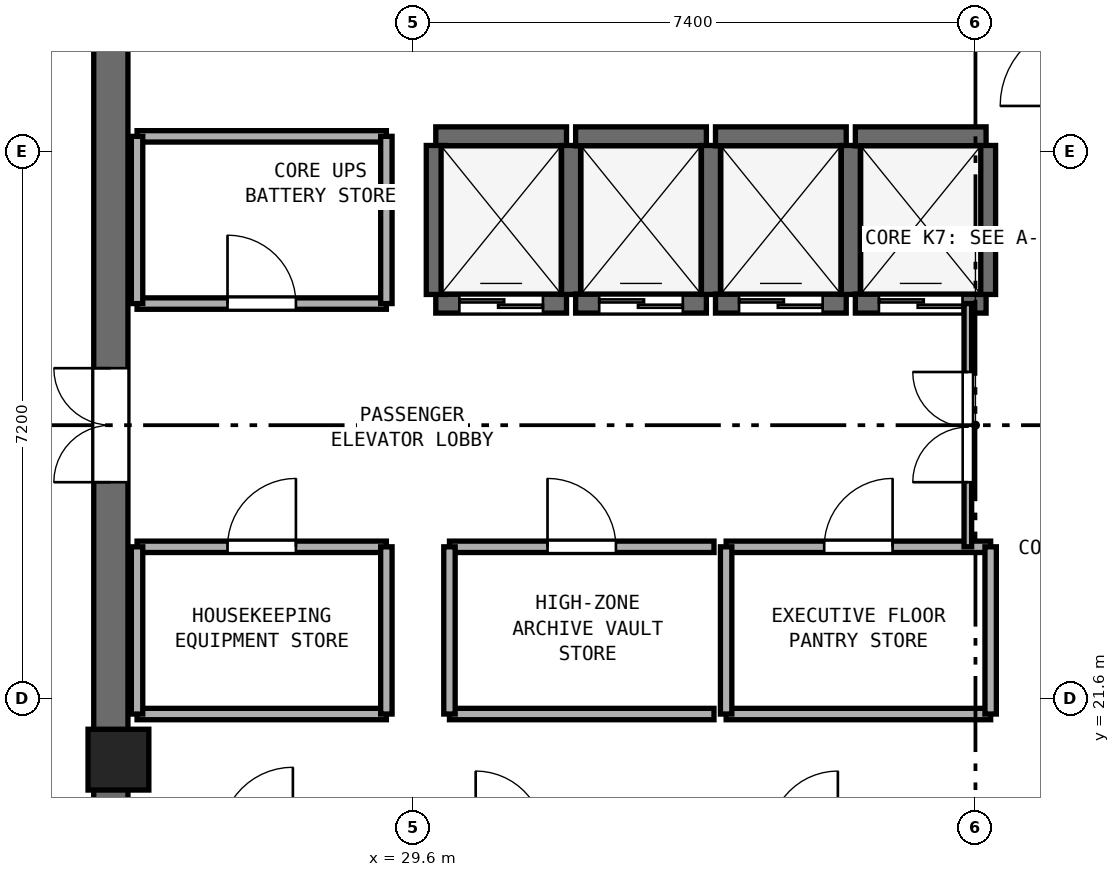
"""IFC4 building model, lengths in metres.
Left out: names, types, materials, properties, quantities, classifications, styles, units other than length and angle.
Written with IfcOpenShell. Run it as: python <this file> out.ifc"""

import sys

from ifc_helpers import new_model, si_unit, direction, frame, frame_2d, origin, origin_2d, place, context, subcontext, project, spatial, rectangle, extrude, element, fill, save


model = new_model("IFC4")
c1 = context("Model", 3, precision=1e-05, world=origin(), true_north=direction((0.0, 1.0)))
c2 = subcontext(c1, "Body", "Model", "MODEL_VIEW")
j1 = project(units=[si_unit("LENGTHUNIT", "METRE"), si_unit("PLANEANGLEUNIT", "RADIAN")], contexts=[c1])
p1 = place(None, origin())
s1 = spatial("IfcSite", under=j1, at=p1, CompositionType="ELEMENT")
p2 = place(p1, origin())
s2 = spatial("IfcBuilding", under=s1, at=p2, CompositionType="ELEMENT")
p3 = place(p2, frame((0.0, 0.0, 293.4)))
s3 = spatial("IfcBuildingStorey", under=s2, at=p3, CompositionType="ELEMENT", Elevation=293.4)
p4 = place(p3, frame((25.625, 17.45, 0.0), z_axis=(0.0, 0.0, 1.0), x_axis=(0.0, 1.0, 0.0)))
e1 = element("IfcWall", 1, at=p4, inside=s3, PredefinedType="SHEAR", context=c2, shape_type="SweptSolid", body=[
    extrude(rectangle(XDim=15.5, YDim=0.45, at=frame_2d((7.75, 0.0))), origin(), (0.0, 0.0, 1.0), 3.54),
])
p5 = place(p4, frame((7.0, 0.0, 0.0)))
e2 = element("IfcOpeningElement", 2, at=p5, cuts=e1, PredefinedType="OPENING", context=c2, shape_type="SweptSolid", body=[
    extrude(rectangle(XDim=1.5, YDim=2.15, at=frame_2d((0.75, 1.075))), frame((0.0, 0.235, 0.0), z_axis=(0.0, -1.0, 0.0), x_axis=(1.0, 0.0, 0.0)), (0.0, 0.0, 1.0), 0.47),
])
p6 = place(p3, frame((25.725, 20.8, 0.0), z_axis=(0.0, 0.0, 1.0), x_axis=(1.0, 0.0, 0.0)))
e3 = element("IfcColumn", 3, at=p6, inside=s3, PredefinedType="PILASTER", context=c2, shape_type="SweptSolid", body=[
    extrude(rectangle(XDim=0.8, YDim=0.8, at=origin_2d()), origin(), (0.0, 0.0, 1.0), 3.8),
])
p7 = place(p3, frame((29.9, 26.8, 0.0), z_axis=(0.0, 0.0, 1.0), x_axis=(1.0, 0.0, 0.0)))
e4 = element("IfcWall", 4, at=p7, inside=s3, PredefinedType="SHEAR", context=c2, shape_type="SweptSolid", body=[
    extrude(rectangle(XDim=1.72, YDim=0.25, at=frame_2d((0.86, 0.0))), origin(), (0.0, 0.0, 1.0), 3.54),
])
p8 = place(p7, frame((0.31, 0.0, 0.0)))
e5 = element("IfcOpeningElement", 5, at=p8, cuts=e4, PredefinedType="OPENING", context=c2, shape_type="SweptSolid", body=[
    extrude(rectangle(XDim=1.1, YDim=2.15, at=frame_2d((0.55, 1.075))), frame((0.0, 0.135, 0.0), z_axis=(0.0, -1.0, 0.0), x_axis=(1.0, 0.0, 0.0)), (0.0, 0.0, 1.0), 0.27),
])
p9 = place(p3, frame((29.9, 29.0, 0.0), z_axis=(0.0, 0.0, 1.0), x_axis=(1.0, 0.0, 0.0)))
e6 = element("IfcWall", 6, at=p9, inside=s3, PredefinedType="SHEAR", context=c2, shape_type="SweptSolid", body=[
    extrude(rectangle(XDim=1.72, YDim=0.25, at=frame_2d((0.86, 0.0))), origin(), (0.0, 0.0, 1.0), 3.54),
])
for number, where, z_axis, x_axis in (
    (7, (29.9, 26.92, 0.0), (0.0, 0.0, 1.0), (0.0, 1.0, 0.0)),
    (8, (31.68, 26.92, 0.0), (0.0, 0.0, 1.0), (0.0, 1.0, 0.0)),
):
    element("IfcWall", number, at=place(p3, frame(where, z_axis=z_axis, x_axis=x_axis)), inside=s3, PredefinedType="SHEAR", context=c2, shape_type="SweptSolid", body=[
        extrude(rectangle(XDim=1.96, YDim=0.25, at=frame_2d((0.98, 0.0))), origin(), (0.0, 0.0, 1.0), 3.54),
    ])
p10 = place(p3, frame((31.74, 26.8, 0.0), z_axis=(0.0, 0.0, 1.0), x_axis=(1.0, 0.0, 0.0)))
e9 = element("IfcWall", 9, at=p10, inside=s3, PredefinedType="SHEAR", context=c2, shape_type="SweptSolid", body=[
    extrude(rectangle(XDim=1.72, YDim=0.25, at=frame_2d((0.86, 0.0))), origin(), (0.0, 0.0, 1.0), 3.54),
])
p11 = place(p10, frame((0.31, 0.0, 0.0)))
e10 = element("IfcOpeningElement", 10, at=p11, cuts=e9, PredefinedType="OPENING", context=c2, shape_type="SweptSolid", body=[
    extrude(rectangle(XDim=1.1, YDim=2.15, at=frame_2d((0.55, 1.075))), frame((0.0, 0.135, 0.0), z_axis=(0.0, -1.0, 0.0), x_axis=(1.0, 0.0, 0.0)), (0.0, 0.0, 1.0), 0.27),
])
p12 = place(p3, frame((31.74, 29.0, 0.0), z_axis=(0.0, 0.0, 1.0), x_axis=(1.0, 0.0, 0.0)))
e11 = element("IfcWall", 11, at=p12, inside=s3, PredefinedType="SHEAR", context=c2, shape_type="SweptSolid", body=[
    extrude(rectangle(XDim=1.72, YDim=0.25, at=frame_2d((0.86, 0.0))), origin(), (0.0, 0.0, 1.0), 3.54),
])
p13 = place(p3, frame((33.52, 26.92, 0.0), z_axis=(0.0, 0.0, 1.0), x_axis=(0.0, 1.0, 0.0)))
e12 = element("IfcWall", 12, at=p13, inside=s3, PredefinedType="SHEAR", context=c2, shape_type="SweptSolid", body=[
    extrude(rectangle(XDim=1.96, YDim=0.25, at=frame_2d((0.98, 0.0))), origin(), (0.0, 0.0, 1.0), 3.54),
])
p14 = place(p3, frame((33.58, 26.8, 0.0), z_axis=(0.0, 0.0, 1.0), x_axis=(1.0, 0.0, 0.0)))
e13 = element("IfcWall", 13, at=p14, inside=s3, PredefinedType="SHEAR", context=c2, shape_type="SweptSolid", body=[
    extrude(rectangle(XDim=1.72, YDim=0.25, at=frame_2d((0.86, 0.0))), origin(), (0.0, 0.0, 1.0), 3.54),
])
p15 = place(p14, frame((0.31, 0.0, 0.0)))
e14 = element("IfcOpeningElement", 14, at=p15, cuts=e13, PredefinedType="OPENING", context=c2, shape_type="SweptSolid", body=[
    extrude(rectangle(XDim=1.1, YDim=2.15, at=frame_2d((0.55, 1.075))), frame((0.0, 0.135, 0.0), z_axis=(0.0, -1.0, 0.0), x_axis=(1.0, 0.0, 0.0)), (0.0, 0.0, 1.0), 0.27),
])
p16 = place(p3, frame((33.58, 29.0, 0.0), z_axis=(0.0, 0.0, 1.0), x_axis=(1.0, 0.0, 0.0)))
e15 = element("IfcWall", 15, at=p16, inside=s3, PredefinedType="SHEAR", context=c2, shape_type="SweptSolid", body=[
    extrude(rectangle(XDim=1.72, YDim=0.25, at=frame_2d((0.86, 0.0))), origin(), (0.0, 0.0, 1.0), 3.54),
])
p17 = place(p3, frame((35.36, 26.92, 0.0), z_axis=(0.0, 0.0, 1.0), x_axis=(0.0, 1.0, 0.0)))
e16 = element("IfcWall", 16, at=p17, inside=s3, PredefinedType="SHEAR", context=c2, shape_type="SweptSolid", body=[
    extrude(rectangle(XDim=1.96, YDim=0.25, at=frame_2d((0.98, 0.0))), origin(), (0.0, 0.0, 1.0), 3.54),
])
p18 = place(p3, frame((35.42, 26.8, 0.0), z_axis=(0.0, 0.0, 1.0), x_axis=(1.0, 0.0, 0.0)))
e17 = element("IfcWall", 17, at=p18, inside=s3, PredefinedType="SHEAR", context=c2, shape_type="SweptSolid", body=[
    extrude(rectangle(XDim=1.72, YDim=0.25, at=frame_2d((0.86, 0.0))), origin(), (0.0, 0.0, 1.0), 3.54),
])
p19 = place(p18, frame((0.31, 0.0, 0.0)))
e18 = element("IfcOpeningElement", 18, at=p19, cuts=e17, PredefinedType="OPENING", context=c2, shape_type="SweptSolid", body=[
    extrude(rectangle(XDim=1.1, YDim=2.15, at=frame_2d((0.55, 1.075))), frame((0.0, 0.135, 0.0), z_axis=(0.0, -1.0, 0.0), x_axis=(1.0, 0.0, 0.0)), (0.0, 0.0, 1.0), 0.27),
])
p20 = place(p3, frame((35.42, 29.0, 0.0), z_axis=(0.0, 0.0, 1.0), x_axis=(1.0, 0.0, 0.0)))
e19 = element("IfcWall", 19, at=p20, inside=s3, PredefinedType="SHEAR", context=c2, shape_type="SweptSolid", body=[
    extrude(rectangle(XDim=1.72, YDim=0.25, at=frame_2d((0.86, 0.0))), origin(), (0.0, 0.0, 1.0), 3.54),
])
p21 = place(p3, frame((37.14, 26.92, 0.0), z_axis=(0.0, 0.0, 1.0), x_axis=(0.0, 1.0, 0.0)))
e20 = element("IfcWall", 20, at=p21, inside=s3, PredefinedType="SHEAR", context=c2, shape_type="SweptSolid", body=[
    extrude(rectangle(XDim=1.96, YDim=0.25, at=frame_2d((0.98, 0.0))), origin(), (0.0, 0.0, 1.0), 3.54),
])
p22 = place(p3, frame((25.97, 26.8, 0.0), z_axis=(0.0, 0.0, 1.0), x_axis=(1.0, 0.0, 0.0)))
e21 = element("IfcWall", 21, at=p22, inside=s3, PredefinedType="PARTITIONING", context=c2, shape_type="SweptSolid", body=[
    extrude(rectangle(XDim=3.28, YDim=0.15, at=frame_2d((1.64, 0.0))), origin(), (0.0, 0.0, 1.0), 3.54),
])
p23 = place(p22, frame((1.19, 0.0, 0.0)))
e22 = element("IfcOpeningElement", 22, at=p23, cuts=e21, PredefinedType="OPENING", context=c2, shape_type="SweptSolid", body=[
    extrude(rectangle(XDim=0.9, YDim=2.1, at=frame_2d((0.45, 1.05))), frame((0.0, 0.085, 0.0), z_axis=(0.0, -1.0, 0.0), x_axis=(1.0, 0.0, 0.0)), (0.0, 0.0, 1.0), 0.17),
])
p24 = place(p3, frame((25.97, 29.0, 0.0), z_axis=(0.0, 0.0, 1.0), x_axis=(1.0, 0.0, 0.0)))
e23 = element("IfcWall", 23, at=p24, inside=s3, PredefinedType="PARTITIONING", context=c2, shape_type="SweptSolid", body=[
    extrude(rectangle(XDim=3.28, YDim=0.15, at=frame_2d((1.64, 0.0))), origin(), (0.0, 0.0, 1.0), 3.54),
])
p25 = place(p3, frame((25.97, 26.8, 0.0), z_axis=(0.0, 0.0, 1.0), x_axis=(0.0, 1.0, 0.0)))
e24 = element("IfcWall", 24, at=p25, inside=s3, PredefinedType="PARTITIONING", context=c2, shape_type="SweptSolid", body=[
    extrude(rectangle(XDim=2.2, YDim=0.15, at=frame_2d((1.1, 0.0))), origin(), (0.0, 0.0, 1.0), 2.64),
])
p26 = place(p3, frame((29.25, 26.8, 0.0), z_axis=(0.0, 0.0, 1.0), x_axis=(0.0, 1.0, 0.0)))
e25 = element("IfcWall", 25, at=p26, inside=s3, PredefinedType="PARTITIONING", context=c2, shape_type="SweptSolid", body=[
    extrude(rectangle(XDim=2.2, YDim=0.15, at=frame_2d((1.1, 0.0))), origin(), (0.0, 0.0, 1.0), 3.54),
])
p27 = place(p3, frame((25.97, 21.4, 0.0), z_axis=(0.0, 0.0, 1.0), x_axis=(1.0, 0.0, 0.0)))
e26 = element("IfcWall", 26, at=p27, inside=s3, PredefinedType="PARTITIONING", context=c2, shape_type="SweptSolid", body=[
    extrude(rectangle(XDim=3.28, YDim=0.15, at=frame_2d((1.64, 0.0))), origin(), (0.0, 0.0, 1.0), 3.54),
])
p28 = place(p3, frame((25.97, 23.6, 0.0), z_axis=(0.0, 0.0, 1.0), x_axis=(1.0, 0.0, 0.0)))
e27 = element("IfcWall", 27, at=p28, inside=s3, PredefinedType="PARTITIONING", context=c2, shape_type="SweptSolid", body=[
    extrude(rectangle(XDim=3.28, YDim=0.15, at=frame_2d((1.64, 0.0))), origin(), (0.0, 0.0, 1.0), 3.54),
])
p29 = place(p28, frame((1.19, 0.0, 0.0)))
e28 = element("IfcOpeningElement", 28, at=p29, cuts=e27, PredefinedType="OPENING", context=c2, shape_type="SweptSolid", body=[
    extrude(rectangle(XDim=0.9, YDim=2.1, at=frame_2d((0.45, 1.05))), frame((0.0, 0.085, 0.0), z_axis=(0.0, -1.0, 0.0), x_axis=(1.0, 0.0, 0.0)), (0.0, 0.0, 1.0), 0.17),
])
p30 = place(p3, frame((25.97, 21.4, 0.0), z_axis=(0.0, 0.0, 1.0), x_axis=(0.0, 1.0, 0.0)))
e29 = element("IfcWall", 29, at=p30, inside=s3, PredefinedType="PARTITIONING", context=c2, shape_type="SweptSolid", body=[
    extrude(rectangle(XDim=2.2, YDim=0.15, at=frame_2d((1.1, 0.0))), origin(), (0.0, 0.0, 1.0), 2.64),
])
p31 = place(p3, frame((29.25, 21.4, 0.0), z_axis=(0.0, 0.0, 1.0), x_axis=(0.0, 1.0, 0.0)))
e30 = element("IfcWall", 30, at=p31, inside=s3, PredefinedType="PARTITIONING", context=c2, shape_type="SweptSolid", body=[
    extrude(rectangle(XDim=2.2, YDim=0.15, at=frame_2d((1.1, 0.0))), origin(), (0.0, 0.0, 1.0), 3.54),
])
p32 = place(p3, frame((30.08, 21.4, 0.0), z_axis=(0.0, 0.0, 1.0), x_axis=(1.0, 0.0, 0.0)))
e31 = element("IfcWall", 31, at=p32, inside=s3, PredefinedType="PARTITIONING", context=c2, shape_type="SweptSolid", body=[
    extrude(rectangle(XDim=3.48, YDim=0.15, at=frame_2d((1.74, 0.0))), origin(), (0.0, 0.0, 1.0), 3.54),
])
p33 = place(p3, frame((30.08, 23.6, 0.0), z_axis=(0.0, 0.0, 1.0), x_axis=(1.0, 0.0, 0.0)))
e32 = element("IfcWall", 32, at=p33, inside=s3, PredefinedType="PARTITIONING", context=c2, shape_type="SweptSolid", body=[
    extrude(rectangle(XDim=3.48, YDim=0.15, at=frame_2d((1.74, 0.0))), origin(), (0.0, 0.0, 1.0), 3.54),
])
p34 = place(p33, frame((1.29, 0.0, 0.0)))
e33 = element("IfcOpeningElement", 33, at=p34, cuts=e32, PredefinedType="OPENING", context=c2, shape_type="SweptSolid", body=[
    extrude(rectangle(XDim=0.9, YDim=2.1, at=frame_2d((0.45, 1.05))), frame((0.0, 0.085, 0.0), z_axis=(0.0, -1.0, 0.0), x_axis=(1.0, 0.0, 0.0)), (0.0, 0.0, 1.0), 0.17),
])
p35 = place(p3, frame((30.08, 21.4, 0.0), z_axis=(0.0, 0.0, 1.0), x_axis=(0.0, 1.0, 0.0)))
e34 = element("IfcWall", 34, at=p35, inside=s3, PredefinedType="PARTITIONING", context=c2, shape_type="SweptSolid", body=[
    extrude(rectangle(XDim=2.2, YDim=0.15, at=frame_2d((1.1, 0.0))), origin(), (0.0, 0.0, 1.0), 3.54),
])
p36 = place(p3, frame((33.72, 21.4, 0.0), z_axis=(0.0, 0.0, 1.0), x_axis=(1.0, 0.0, 0.0)))
e35 = element("IfcWall", 35, at=p36, inside=s3, PredefinedType="PARTITIONING", context=c2, shape_type="SweptSolid", body=[
    extrude(rectangle(XDim=3.48, YDim=0.15, at=frame_2d((1.74, 0.0))), origin(), (0.0, 0.0, 1.0), 3.54),
])
p37 = place(p3, frame((33.72, 23.6, 0.0), z_axis=(0.0, 0.0, 1.0), x_axis=(1.0, 0.0, 0.0)))
e36 = element("IfcWall", 36, at=p37, inside=s3, PredefinedType="PARTITIONING", context=c2, shape_type="SweptSolid", body=[
    extrude(rectangle(XDim=3.48, YDim=0.15, at=frame_2d((1.74, 0.0))), origin(), (0.0, 0.0, 1.0), 3.54),
])
p38 = place(p37, frame((1.29, 0.0, 0.0)))
e37 = element("IfcOpeningElement", 37, at=p38, cuts=e36, PredefinedType="OPENING", context=c2, shape_type="SweptSolid", body=[
    extrude(rectangle(XDim=0.9, YDim=2.1, at=frame_2d((0.45, 1.05))), frame((0.0, 0.085, 0.0), z_axis=(0.0, -1.0, 0.0), x_axis=(1.0, 0.0, 0.0)), (0.0, 0.0, 1.0), 0.17),
])
for number, where, z_axis, x_axis in (
    (38, (33.72, 21.4, 0.0), (0.0, 0.0, 1.0), (0.0, 1.0, 0.0)),
    (39, (37.2, 21.4, 0.0), (0.0, 0.0, 1.0), (0.0, 1.0, 0.0)),
):
    element("IfcWall", number, at=place(p3, frame(where, z_axis=z_axis, x_axis=x_axis)), inside=s3, PredefinedType="PARTITIONING", context=c2, shape_type="SweptSolid", body=[
        extrude(rectangle(XDim=2.2, YDim=0.15, at=frame_2d((1.1, 0.0))), origin(), (0.0, 0.0, 1.0), 3.54),
    ])
p39 = place(p3, frame((36.9, 23.6, 0.0), z_axis=(0.0, 0.0, 1.0), x_axis=(0.0, 1.0, 0.0)))
e40 = element("IfcWall", 40, at=p39, inside=s3, PredefinedType="PARTITIONING", context=c2, shape_type="SweptSolid", body=[
    extrude(rectangle(XDim=3.2, YDim=0.1, at=frame_2d((1.6, 0.0))), origin(), (0.0, 0.0, 1.0), 3.54),
])
p40 = place(p39, frame((0.85, 0.0, 0.0)))
e41 = element("IfcOpeningElement", 41, at=p40, cuts=e40, PredefinedType="OPENING", context=c2, shape_type="SweptSolid", body=[
    extrude(rectangle(XDim=1.45, YDim=2.12, at=frame_2d((0.725, 1.06))), frame((0.0, 0.06, 0.0), z_axis=(0.0, -1.0, 0.0), x_axis=(1.0, 0.0, 0.0)), (0.0, 0.0, 1.0), 0.12),
])
p41 = place(p8, origin())
e42 = element("IfcDoor", 42, at=p41, inside=s3, OperationType="DOUBLE_DOOR_SLIDING", PredefinedType="DOOR", context=c2, shape_type="SweptSolid", body=[
    extrude(rectangle(XDim=1.1, YDim=2.15, at=frame_2d((0.55, 1.075))), frame((0.0, 0.025, 0.0), z_axis=(0.0, -1.0, 0.0), x_axis=(1.0, 0.0, 0.0)), (0.0, 0.0, 1.0), 0.05),
])
fill(e5, e42)
p42 = place(p11, origin())
e43 = element("IfcDoor", 43, at=p42, inside=s3, OperationType="DOUBLE_DOOR_SLIDING", PredefinedType="DOOR", context=c2, shape_type="SweptSolid", body=[
    extrude(rectangle(XDim=1.1, YDim=2.15, at=frame_2d((0.55, 1.075))), frame((0.0, 0.025, 0.0), z_axis=(0.0, -1.0, 0.0), x_axis=(1.0, 0.0, 0.0)), (0.0, 0.0, 1.0), 0.05),
])
fill(e10, e43)
p43 = place(p15, origin())
e44 = element("IfcDoor", 44, at=p43, inside=s3, OperationType="DOUBLE_DOOR_SLIDING", PredefinedType="DOOR", context=c2, shape_type="SweptSolid", body=[
    extrude(rectangle(XDim=1.1, YDim=2.15, at=frame_2d((0.55, 1.075))), frame((0.0, 0.025, 0.0), z_axis=(0.0, -1.0, 0.0), x_axis=(1.0, 0.0, 0.0)), (0.0, 0.0, 1.0), 0.05),
])
fill(e14, e44)
p44 = place(p19, origin())
e45 = element("IfcDoor", 45, at=p44, inside=s3, OperationType="DOUBLE_DOOR_SLIDING", PredefinedType="DOOR", context=c2, shape_type="SweptSolid", body=[
    extrude(rectangle(XDim=1.1, YDim=2.15, at=frame_2d((0.55, 1.075))), frame((0.0, 0.025, 0.0), z_axis=(0.0, -1.0, 0.0), x_axis=(1.0, 0.0, 0.0)), (0.0, 0.0, 1.0), 0.05),
])
fill(e18, e45)
p45 = place(p5, origin())
e46 = element("IfcDoor", 46, at=p45, inside=s3, OperationType="DOUBLE_DOOR_SINGLE_SWING", PredefinedType="DOOR", context=c2, shape_type="SweptSolid", body=[
    extrude(rectangle(XDim=1.5, YDim=2.15, at=frame_2d((0.75, 1.075))), frame((0.0, 0.025, 0.0), z_axis=(0.0, -1.0, 0.0), x_axis=(1.0, 0.0, 0.0)), (0.0, 0.0, 1.0), 0.05),
])
fill(e2, e46)
p46 = place(p23, origin())
e47 = element("IfcDoor", 47, at=p46, inside=s3, OperationType="SINGLE_SWING_LEFT", PredefinedType="DOOR", context=c2, shape_type="SweptSolid", body=[
    extrude(rectangle(XDim=0.9, YDim=2.1, at=frame_2d((0.45, 1.05))), frame((0.0, 0.025, 0.0), z_axis=(0.0, -1.0, 0.0), x_axis=(1.0, 0.0, 0.0)), (0.0, 0.0, 1.0), 0.05),
])
fill(e22, e47)
p47 = place(p29, origin())
e48 = element("IfcDoor", 48, at=p47, inside=s3, OperationType="SINGLE_SWING_RIGHT", PredefinedType="DOOR", context=c2, shape_type="SweptSolid", body=[
    extrude(rectangle(XDim=0.9, YDim=2.1, at=frame_2d((0.45, 1.05))), frame((0.0, 0.025, 0.0), z_axis=(0.0, -1.0, 0.0), x_axis=(1.0, 0.0, 0.0)), (0.0, 0.0, 1.0), 0.05),
])
fill(e28, e48)
p48 = place(p34, origin())
e49 = element("IfcDoor", 49, at=p48, inside=s3, OperationType="SINGLE_SWING_LEFT", PredefinedType="DOOR", context=c2, shape_type="SweptSolid", body=[
    extrude(rectangle(XDim=0.9, YDim=2.1, at=frame_2d((0.45, 1.05))), frame((0.0, 0.025, 0.0), z_axis=(0.0, -1.0, 0.0), x_axis=(1.0, 0.0, 0.0)), (0.0, 0.0, 1.0), 0.05),
])
fill(e33, e49)
p49 = place(p38, origin())
e50 = element("IfcDoor", 50, at=p49, inside=s3, OperationType="SINGLE_SWING_RIGHT", PredefinedType="DOOR", context=c2, shape_type="SweptSolid", body=[
    extrude(rectangle(XDim=0.9, YDim=2.1, at=frame_2d((0.45, 1.05))), frame((0.0, 0.025, 0.0), z_axis=(0.0, -1.0, 0.0), x_axis=(1.0, 0.0, 0.0)), (0.0, 0.0, 1.0), 0.05),
])
fill(e37, e50)
p50 = place(p40, origin())
e51 = element("IfcDoor", 51, at=p50, inside=s3, OperationType="DOUBLE_DOOR_SINGLE_SWING", PredefinedType="DOOR", context=c2, shape_type="SweptSolid", body=[
    extrude(rectangle(XDim=1.45, YDim=2.12, at=frame_2d((0.725, 1.06))), frame((0.0, 0.025, 0.0), z_axis=(0.0, -1.0, 0.0), x_axis=(1.0, 0.0, 0.0)), (0.0, 0.0, 1.0), 0.05),
])
fill(e41, e51)
save(model, sys.argv[1])
